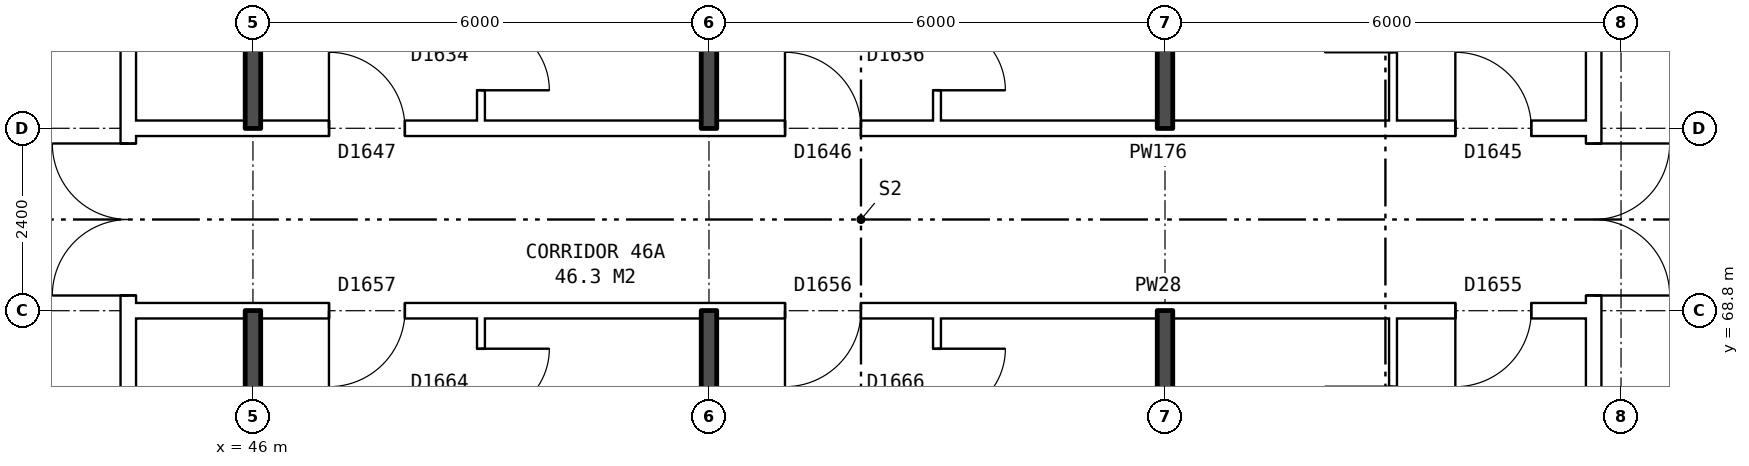
"""IFC4 building model, lengths in metres.
Left out: names, types, materials, properties, quantities, classifications, styles, units other than length and angle.
Written with IfcOpenShell. Run it as: python <this file> out.ifc"""

import sys

from ifc_helpers import new_model, si_unit, direction, frame, frame_2d, origin, place, context, subcontext, project, spatial, rectangle, extrude, element, fill, save


model = new_model("IFC4")
c1 = context("Model", 3, precision=1e-05, world=origin(), true_north=direction((0.0, 1.0)))
c2 = subcontext(c1, "Body", "Model", "MODEL_VIEW")
j1 = project(units=[si_unit("LENGTHUNIT", "METRE"), si_unit("PLANEANGLEUNIT", "RADIAN")], contexts=[c1])
p1 = place(None, origin())
s1 = spatial("IfcSite", under=j1, at=p1, CompositionType="ELEMENT")
p2 = place(p1, origin())
s2 = spatial("IfcBuilding", under=s1, at=p2, CompositionType="ELEMENT")
p3 = place(p2, frame((0.0, 0.0, 164.0)))
s3 = spatial("IfcBuildingStorey", under=s2, at=p3, CompositionType="ELEMENT", Elevation=164.0)
p4 = place(p3, frame((63.64, 63.9, 0.0), z_axis=(0.0, 0.0, 1.0), x_axis=(0.0, 1.0, 0.0)))
e1 = element("IfcWall", 1, at=p4, inside=s3, PredefinedType="PARTITIONING", context=c2, shape_type="SweptSolid", body=[
    extrude(rectangle(XDim=12.2, YDim=0.2, at=frame_2d((6.1, 0.0))), origin(), (0.0, 0.0, 1.0), 2.85),
])
p5 = place(p4, frame((5.1, 0.0, 0.0)))
e2 = element("IfcOpeningElement", 2, at=p5, cuts=e1, PredefinedType="OPENING", context=c2, shape_type="SweptSolid", body=[
    extrude(rectangle(XDim=2.0, YDim=2.1, at=frame_2d((1.0, 1.05))), frame((0.0, 0.11, 0.0), z_axis=(0.0, -1.0, 0.0), x_axis=(1.0, 0.0, 0.0)), (0.0, 0.0, 1.0), 0.22),
])
p6 = place(p3, frame((44.36, 63.9, 0.0), z_axis=(0.0, 0.0, 1.0), x_axis=(0.0, 1.0, 0.0)))
e3 = element("IfcWall", 3, at=p6, inside=s3, PredefinedType="PARTITIONING", context=c2, shape_type="SweptSolid", body=[
    extrude(rectangle(XDim=12.2, YDim=0.2, at=frame_2d((6.1, 0.0))), origin(), (0.0, 0.0, 1.0), 2.85),
])
p7 = place(p6, frame((5.1, 0.0, 0.0)))
e4 = element("IfcOpeningElement", 4, at=p7, cuts=e3, PredefinedType="OPENING", context=c2, shape_type="SweptSolid", body=[
    extrude(rectangle(XDim=2.0, YDim=2.1, at=frame_2d((1.0, 1.05))), frame((0.0, 0.11, 0.0), z_axis=(0.0, -1.0, 0.0), x_axis=(1.0, 0.0, 0.0)), (0.0, 0.0, 1.0), 0.22),
])
p8 = place(p3, frame((44.36, 68.8, 0.0), z_axis=(0.0, 0.0, 1.0), x_axis=(1.0, 0.0, 0.0)))
e5 = element("IfcWall", 5, at=p8, inside=s3, PredefinedType="PARTITIONING", context=c2, shape_type="SweptSolid", body=[
    extrude(rectangle(XDim=19.28, YDim=0.2, at=frame_2d((9.64, 0.0))), origin(), (0.0, 0.0, 1.0), 2.85),
])
p9 = place(p8, frame((17.46, 0.0, 0.0)))
e6 = element("IfcOpeningElement", 6, at=p9, cuts=e5, PredefinedType="OPENING", context=c2, shape_type="SweptSolid", body=[
    extrude(rectangle(XDim=1.0, YDim=2.1, at=frame_2d((0.5, 1.05))), frame((0.0, 0.11, 0.0), z_axis=(0.0, -1.0, 0.0), x_axis=(1.0, 0.0, 0.0)), (0.0, 0.0, 1.0), 0.22),
])
p10 = place(p8, frame((8.64, 0.0, 0.0)))
e7 = element("IfcOpeningElement", 7, at=p10, cuts=e5, PredefinedType="OPENING", context=c2, shape_type="SweptSolid", body=[
    extrude(rectangle(XDim=1.0, YDim=2.1, at=frame_2d((0.5, 1.05))), frame((0.0, 0.11, 0.0), z_axis=(0.0, -1.0, 0.0), x_axis=(1.0, 0.0, 0.0)), (0.0, 0.0, 1.0), 0.22),
])
p11 = place(p8, frame((2.64, 0.0, 0.0)))
e8 = element("IfcOpeningElement", 8, at=p11, cuts=e5, PredefinedType="OPENING", context=c2, shape_type="SweptSolid", body=[
    extrude(rectangle(XDim=1.0, YDim=2.1, at=frame_2d((0.5, 1.05))), frame((0.0, 0.11, 0.0), z_axis=(0.0, -1.0, 0.0), x_axis=(1.0, 0.0, 0.0)), (0.0, 0.0, 1.0), 0.22),
])
p12 = place(p3, frame((44.36, 71.2, 0.0), z_axis=(0.0, 0.0, 1.0), x_axis=(1.0, 0.0, 0.0)))
e9 = element("IfcWall", 9, at=p12, inside=s3, PredefinedType="PARTITIONING", context=c2, shape_type="SweptSolid", body=[
    extrude(rectangle(XDim=19.28, YDim=0.2, at=frame_2d((9.64, 0.0))), origin(), (0.0, 0.0, 1.0), 2.85),
])
p13 = place(p12, frame((17.46, 0.0, 0.0)))
e10 = element("IfcOpeningElement", 10, at=p13, cuts=e9, PredefinedType="OPENING", context=c2, shape_type="SweptSolid", body=[
    extrude(rectangle(XDim=1.0, YDim=2.1, at=frame_2d((0.5, 1.05))), frame((0.0, 0.11, 0.0), z_axis=(0.0, -1.0, 0.0), x_axis=(1.0, 0.0, 0.0)), (0.0, 0.0, 1.0), 0.22),
])
p14 = place(p12, frame((8.64, 0.0, 0.0)))
e11 = element("IfcOpeningElement", 11, at=p14, cuts=e9, PredefinedType="OPENING", context=c2, shape_type="SweptSolid", body=[
    extrude(rectangle(XDim=1.0, YDim=2.1, at=frame_2d((0.5, 1.05))), frame((0.0, 0.11, 0.0), z_axis=(0.0, -1.0, 0.0), x_axis=(1.0, 0.0, 0.0)), (0.0, 0.0, 1.0), 0.22),
])
p15 = place(p12, frame((2.64, 0.0, 0.0)))
e12 = element("IfcOpeningElement", 12, at=p15, cuts=e9, PredefinedType="OPENING", context=c2, shape_type="SweptSolid", body=[
    extrude(rectangle(XDim=1.0, YDim=2.1, at=frame_2d((0.5, 1.05))), frame((0.0, 0.11, 0.0), z_axis=(0.0, -1.0, 0.0), x_axis=(1.0, 0.0, 0.0)), (0.0, 0.0, 1.0), 0.22),
])
for number, where, z_axis, x_axis in (
    (13, (46.0, 63.8, 0.0), (0.0, 0.0, 1.0), (0.0, 1.0, 0.0)),
    (14, (46.0, 71.2, 0.0), (0.0, 0.0, 1.0), (0.0, 1.0, 0.0)),
):
    element("IfcWall", number, at=place(p3, frame(where, z_axis=z_axis, x_axis=x_axis)), inside=s3, PredefinedType="SOLIDWALL", context=c2, shape_type="SweptSolid", body=[
        extrude(rectangle(XDim=5.0, YDim=0.2, at=frame_2d((2.5, 0.0))), origin(), (0.0, 0.0, 1.0), 2.85),
    ])
p16 = place(p3, frame((49.0, 54.36, 0.0), z_axis=(0.0, 0.0, 1.0), x_axis=(0.0, 1.0, 0.0)))
e15 = element("IfcWall", 15, at=p16, inside=s3, PredefinedType="PARTITIONING", context=c2, shape_type="SweptSolid", body=[
    extrude(rectangle(XDim=14.34, YDim=0.1, at=frame_2d((7.17, 0.0))), origin(), (0.0, 0.0, 1.0), 2.85),
])
p17 = place(p16, frame((5.5, 0.0, 0.0)))
e16 = element("IfcOpeningElement", 16, at=p17, cuts=e15, PredefinedType="OPENING", context=c2, shape_type="SweptSolid", body=[
    extrude(rectangle(XDim=0.9, YDim=2.1, at=frame_2d((0.45, 1.05))), frame((0.0, 0.06, 0.0), z_axis=(0.0, -1.0, 0.0), x_axis=(1.0, 0.0, 0.0)), (0.0, 0.0, 1.0), 0.12),
])
p18 = place(p16, frame((13.04, 0.0, 0.0)))
e17 = element("IfcOpeningElement", 17, at=p18, cuts=e15, PredefinedType="OPENING", context=c2, shape_type="SweptSolid", body=[
    extrude(rectangle(XDim=0.9, YDim=2.1, at=frame_2d((0.45, 1.05))), frame((0.0, 0.06, 0.0), z_axis=(0.0, -1.0, 0.0), x_axis=(1.0, 0.0, 0.0)), (0.0, 0.0, 1.0), 0.12),
])
p19 = place(p3, frame((49.0, 71.3, 0.0), z_axis=(0.0, 0.0, 1.0), x_axis=(0.0, 1.0, 0.0)))
e18 = element("IfcWall", 18, at=p19, inside=s3, PredefinedType="PARTITIONING", context=c2, shape_type="SweptSolid", body=[
    extrude(rectangle(XDim=14.34, YDim=0.1, at=frame_2d((7.17, 0.0))), origin(), (0.0, 0.0, 1.0), 2.85),
])
p20 = place(p19, frame((7.94, 0.0, 0.0)))
e19 = element("IfcOpeningElement", 19, at=p20, cuts=e18, PredefinedType="OPENING", context=c2, shape_type="SweptSolid", body=[
    extrude(rectangle(XDim=0.9, YDim=2.1, at=frame_2d((0.45, 1.05))), frame((0.0, 0.06, 0.0), z_axis=(0.0, -1.0, 0.0), x_axis=(1.0, 0.0, 0.0)), (0.0, 0.0, 1.0), 0.12),
])
p21 = place(p19, frame((0.4, 0.0, 0.0)))
e20 = element("IfcOpeningElement", 20, at=p21, cuts=e18, PredefinedType="OPENING", context=c2, shape_type="SweptSolid", body=[
    extrude(rectangle(XDim=0.9, YDim=2.1, at=frame_2d((0.45, 1.05))), frame((0.0, 0.06, 0.0), z_axis=(0.0, -1.0, 0.0), x_axis=(1.0, 0.0, 0.0)), (0.0, 0.0, 1.0), 0.12),
])
for number, where, z_axis, x_axis in (
    (21, (52.0, 54.36, 0.0), (0.0, 0.0, 1.0), (0.0, 1.0, 0.0)),
    (22, (52.0, 71.2, 0.0), (0.0, 0.0, 1.0), (0.0, 1.0, 0.0)),
):
    element("IfcWall", number, at=place(p3, frame(where, z_axis=z_axis, x_axis=x_axis)), inside=s3, PredefinedType="SOLIDWALL", context=c2, shape_type="SweptSolid", body=[
        extrude(rectangle(XDim=14.44, YDim=0.2, at=frame_2d((7.22, 0.0))), origin(), (0.0, 0.0, 1.0), 2.85),
    ])
p22 = place(p3, frame((55.0, 54.36, 0.0), z_axis=(0.0, 0.0, 1.0), x_axis=(0.0, 1.0, 0.0)))
e23 = element("IfcWall", 23, at=p22, inside=s3, PredefinedType="PARTITIONING", context=c2, shape_type="SweptSolid", body=[
    extrude(rectangle(XDim=14.34, YDim=0.1, at=frame_2d((7.17, 0.0))), origin(), (0.0, 0.0, 1.0), 2.85),
])
p23 = place(p22, frame((5.5, 0.0, 0.0)))
e24 = element("IfcOpeningElement", 24, at=p23, cuts=e23, PredefinedType="OPENING", context=c2, shape_type="SweptSolid", body=[
    extrude(rectangle(XDim=0.9, YDim=2.1, at=frame_2d((0.45, 1.05))), frame((0.0, 0.06, 0.0), z_axis=(0.0, -1.0, 0.0), x_axis=(1.0, 0.0, 0.0)), (0.0, 0.0, 1.0), 0.12),
])
p24 = place(p22, frame((13.04, 0.0, 0.0)))
e25 = element("IfcOpeningElement", 25, at=p24, cuts=e23, PredefinedType="OPENING", context=c2, shape_type="SweptSolid", body=[
    extrude(rectangle(XDim=0.9, YDim=2.1, at=frame_2d((0.45, 1.05))), frame((0.0, 0.06, 0.0), z_axis=(0.0, -1.0, 0.0), x_axis=(1.0, 0.0, 0.0)), (0.0, 0.0, 1.0), 0.12),
])
p25 = place(p3, frame((55.0, 71.3, 0.0), z_axis=(0.0, 0.0, 1.0), x_axis=(0.0, 1.0, 0.0)))
e26 = element("IfcWall", 26, at=p25, inside=s3, PredefinedType="PARTITIONING", context=c2, shape_type="SweptSolid", body=[
    extrude(rectangle(XDim=14.34, YDim=0.1, at=frame_2d((7.17, 0.0))), origin(), (0.0, 0.0, 1.0), 2.85),
])
p26 = place(p25, frame((6.74, 0.0, 0.0)))
e27 = element("IfcOpeningElement", 27, at=p26, cuts=e26, PredefinedType="OPENING", context=c2, shape_type="SweptSolid", body=[
    extrude(rectangle(XDim=0.9, YDim=2.1, at=frame_2d((0.45, 1.05))), frame((0.0, 0.06, 0.0), z_axis=(0.0, -1.0, 0.0), x_axis=(1.0, 0.0, 0.0)), (0.0, 0.0, 1.0), 0.12),
])
p27 = place(p25, frame((0.4, 0.0, 0.0)))
e28 = element("IfcOpeningElement", 28, at=p27, cuts=e26, PredefinedType="OPENING", context=c2, shape_type="SweptSolid", body=[
    extrude(rectangle(XDim=0.9, YDim=2.1, at=frame_2d((0.45, 1.05))), frame((0.0, 0.06, 0.0), z_axis=(0.0, -1.0, 0.0), x_axis=(1.0, 0.0, 0.0)), (0.0, 0.0, 1.0), 0.12),
])
for number, where, z_axis, x_axis in (
    (29, (58.0, 54.36, 0.0), (0.0, 0.0, 1.0), (0.0, 1.0, 0.0)),
    (30, (58.0, 71.2, 0.0), (0.0, 0.0, 1.0), (0.0, 1.0, 0.0)),
):
    element("IfcWall", number, at=place(p3, frame(where, z_axis=z_axis, x_axis=x_axis)), inside=s3, PredefinedType="SOLIDWALL", context=c2, shape_type="SweptSolid", body=[
        extrude(rectangle(XDim=14.44, YDim=0.2, at=frame_2d((7.22, 0.0))), origin(), (0.0, 0.0, 1.0), 2.85),
    ])
p28 = place(p3, frame((61.0, 54.36, 0.0), z_axis=(0.0, 0.0, 1.0), x_axis=(0.0, 1.0, 0.0)))
e31 = element("IfcWall", 31, at=p28, inside=s3, PredefinedType="PARTITIONING", context=c2, shape_type="SweptSolid", body=[
    extrude(rectangle(XDim=14.34, YDim=0.1, at=frame_2d((7.17, 0.0))), origin(), (0.0, 0.0, 1.0), 2.85),
])
p29 = place(p28, frame((6.7, 0.0, 0.0)))
e32 = element("IfcOpeningElement", 32, at=p29, cuts=e31, PredefinedType="OPENING", context=c2, shape_type="SweptSolid", body=[
    extrude(rectangle(XDim=0.9, YDim=2.1, at=frame_2d((0.45, 1.05))), frame((0.0, 0.06, 0.0), z_axis=(0.0, -1.0, 0.0), x_axis=(1.0, 0.0, 0.0)), (0.0, 0.0, 1.0), 0.12),
])
p30 = place(p28, frame((12.54, 0.0, 0.0)))
e33 = element("IfcOpeningElement", 33, at=p30, cuts=e31, PredefinedType="OPENING", context=c2, shape_type="SweptSolid", body=[
    extrude(rectangle(XDim=0.9, YDim=2.1, at=frame_2d((0.45, 1.05))), frame((0.0, 0.06, 0.0), z_axis=(0.0, -1.0, 0.0), x_axis=(1.0, 0.0, 0.0)), (0.0, 0.0, 1.0), 0.12),
])
p31 = place(p3, frame((61.0, 71.3, 0.0), z_axis=(0.0, 0.0, 1.0), x_axis=(0.0, 1.0, 0.0)))
e34 = element("IfcWall", 34, at=p31, inside=s3, PredefinedType="PARTITIONING", context=c2, shape_type="SweptSolid", body=[
    extrude(rectangle(XDim=14.34, YDim=0.1, at=frame_2d((7.17, 0.0))), origin(), (0.0, 0.0, 1.0), 2.85),
])
p32 = place(p31, frame((7.94, 0.0, 0.0)))
e35 = element("IfcOpeningElement", 35, at=p32, cuts=e34, PredefinedType="OPENING", context=c2, shape_type="SweptSolid", body=[
    extrude(rectangle(XDim=0.9, YDim=2.1, at=frame_2d((0.45, 1.05))), frame((0.0, 0.06, 0.0), z_axis=(0.0, -1.0, 0.0), x_axis=(1.0, 0.0, 0.0)), (0.0, 0.0, 1.0), 0.12),
])
p33 = place(p31, frame((0.9, 0.0, 0.0)))
e36 = element("IfcOpeningElement", 36, at=p33, cuts=e34, PredefinedType="OPENING", context=c2, shape_type="SweptSolid", body=[
    extrude(rectangle(XDim=0.9, YDim=2.1, at=frame_2d((0.45, 1.05))), frame((0.0, 0.06, 0.0), z_axis=(0.0, -1.0, 0.0), x_axis=(1.0, 0.0, 0.0)), (0.0, 0.0, 1.0), 0.12),
])
p34 = place(p5, frame((2.0, 0.0, 0.0), z_axis=(0.0, 0.0, 1.0), x_axis=(-1.0, 0.0, 0.0)))
e37 = element("IfcDoor", 37, at=p34, inside=s3, OperationType="DOUBLE_DOOR_SINGLE_SWING", PredefinedType="DOOR", context=c2, shape_type="SweptSolid", body=[
    extrude(rectangle(XDim=2.0, YDim=2.1, at=frame_2d((1.0, 1.05))), frame((0.0, 0.025, 0.0), z_axis=(0.0, -1.0, 0.0), x_axis=(1.0, 0.0, 0.0)), (0.0, 0.0, 1.0), 0.05),
])
fill(e2, e37)
p35 = place(p7, origin())
e38 = element("IfcDoor", 38, at=p35, inside=s3, OperationType="DOUBLE_DOOR_SINGLE_SWING", PredefinedType="DOOR", context=c2, shape_type="SweptSolid", body=[
    extrude(rectangle(XDim=2.0, YDim=2.1, at=frame_2d((1.0, 1.05))), frame((0.0, 0.025, 0.0), z_axis=(0.0, -1.0, 0.0), x_axis=(1.0, 0.0, 0.0)), (0.0, 0.0, 1.0), 0.05),
])
fill(e4, e38)
p36 = place(p9, frame((1.0, 0.0, 0.0), z_axis=(0.0, 0.0, 1.0), x_axis=(-1.0, 0.0, 0.0)))
e39 = element("IfcDoor", 39, at=p36, inside=s3, OperationType="SINGLE_SWING_RIGHT", PredefinedType="DOOR", context=c2, shape_type="SweptSolid", body=[
    extrude(rectangle(XDim=1.0, YDim=2.1, at=frame_2d((0.5, 1.05))), frame((0.0, 0.025, 0.0), z_axis=(0.0, -1.0, 0.0), x_axis=(1.0, 0.0, 0.0)), (0.0, 0.0, 1.0), 0.05),
])
fill(e6, e39)
p37 = place(p10, frame((1.0, 0.0, 0.0), z_axis=(0.0, 0.0, 1.0), x_axis=(-1.0, 0.0, 0.0)))
e40 = element("IfcDoor", 40, at=p37, inside=s3, OperationType="SINGLE_SWING_RIGHT", PredefinedType="DOOR", context=c2, shape_type="SweptSolid", body=[
    extrude(rectangle(XDim=1.0, YDim=2.1, at=frame_2d((0.5, 1.05))), frame((0.0, 0.025, 0.0), z_axis=(0.0, -1.0, 0.0), x_axis=(1.0, 0.0, 0.0)), (0.0, 0.0, 1.0), 0.05),
])
fill(e7, e40)
p38 = place(p24, frame((0.9, 0.0, 0.0), z_axis=(0.0, 0.0, 1.0), x_axis=(-1.0, 0.0, 0.0)))
e41 = element("IfcDoor", 41, at=p38, inside=s3, OperationType="SINGLE_SWING_LEFT", PredefinedType="DOOR", context=c2, shape_type="SweptSolid", body=[
    extrude(rectangle(XDim=0.9, YDim=2.1, at=frame_2d((0.45, 1.05))), frame((0.0, 0.025, 0.0), z_axis=(0.0, -1.0, 0.0), x_axis=(1.0, 0.0, 0.0)), (0.0, 0.0, 1.0), 0.05),
])
fill(e25, e41)
p39 = place(p11, frame((1.0, 0.0, 0.0), z_axis=(0.0, 0.0, 1.0), x_axis=(-1.0, 0.0, 0.0)))
e42 = element("IfcDoor", 42, at=p39, inside=s3, OperationType="SINGLE_SWING_RIGHT", PredefinedType="DOOR", context=c2, shape_type="SweptSolid", body=[
    extrude(rectangle(XDim=1.0, YDim=2.1, at=frame_2d((0.5, 1.05))), frame((0.0, 0.025, 0.0), z_axis=(0.0, -1.0, 0.0), x_axis=(1.0, 0.0, 0.0)), (0.0, 0.0, 1.0), 0.05),
])
fill(e8, e42)
p40 = place(p18, frame((0.9, 0.0, 0.0), z_axis=(0.0, 0.0, 1.0), x_axis=(-1.0, 0.0, 0.0)))
e43 = element("IfcDoor", 43, at=p40, inside=s3, OperationType="SINGLE_SWING_LEFT", PredefinedType="DOOR", context=c2, shape_type="SweptSolid", body=[
    extrude(rectangle(XDim=0.9, YDim=2.1, at=frame_2d((0.45, 1.05))), frame((0.0, 0.025, 0.0), z_axis=(0.0, -1.0, 0.0), x_axis=(1.0, 0.0, 0.0)), (0.0, 0.0, 1.0), 0.05),
])
fill(e17, e43)
p41 = place(p13, origin())
e44 = element("IfcDoor", 44, at=p41, inside=s3, OperationType="SINGLE_SWING_LEFT", PredefinedType="DOOR", context=c2, shape_type="SweptSolid", body=[
    extrude(rectangle(XDim=1.0, YDim=2.1, at=frame_2d((0.5, 1.05))), frame((0.0, 0.025, 0.0), z_axis=(0.0, -1.0, 0.0), x_axis=(1.0, 0.0, 0.0)), (0.0, 0.0, 1.0), 0.05),
])
fill(e10, e44)
p42 = place(p14, origin())
e45 = element("IfcDoor", 45, at=p42, inside=s3, OperationType="SINGLE_SWING_LEFT", PredefinedType="DOOR", context=c2, shape_type="SweptSolid", body=[
    extrude(rectangle(XDim=1.0, YDim=2.1, at=frame_2d((0.5, 1.05))), frame((0.0, 0.025, 0.0), z_axis=(0.0, -1.0, 0.0), x_axis=(1.0, 0.0, 0.0)), (0.0, 0.0, 1.0), 0.05),
])
fill(e11, e45)
p43 = place(p27, frame((0.9, 0.0, 0.0), z_axis=(0.0, 0.0, 1.0), x_axis=(-1.0, 0.0, 0.0)))
e46 = element("IfcDoor", 46, at=p43, inside=s3, OperationType="SINGLE_SWING_RIGHT", PredefinedType="DOOR", context=c2, shape_type="SweptSolid", body=[
    extrude(rectangle(XDim=0.9, YDim=2.1, at=frame_2d((0.45, 1.05))), frame((0.0, 0.025, 0.0), z_axis=(0.0, -1.0, 0.0), x_axis=(1.0, 0.0, 0.0)), (0.0, 0.0, 1.0), 0.05),
])
fill(e28, e46)
p44 = place(p15, origin())
e47 = element("IfcDoor", 47, at=p44, inside=s3, OperationType="SINGLE_SWING_LEFT", PredefinedType="DOOR", context=c2, shape_type="SweptSolid", body=[
    extrude(rectangle(XDim=1.0, YDim=2.1, at=frame_2d((0.5, 1.05))), frame((0.0, 0.025, 0.0), z_axis=(0.0, -1.0, 0.0), x_axis=(1.0, 0.0, 0.0)), (0.0, 0.0, 1.0), 0.05),
])
fill(e12, e47)
p45 = place(p21, frame((0.9, 0.0, 0.0), z_axis=(0.0, 0.0, 1.0), x_axis=(-1.0, 0.0, 0.0)))
e48 = element("IfcDoor", 48, at=p45, inside=s3, OperationType="SINGLE_SWING_RIGHT", PredefinedType="DOOR", context=c2, shape_type="SweptSolid", body=[
    extrude(rectangle(XDim=0.9, YDim=2.1, at=frame_2d((0.45, 1.05))), frame((0.0, 0.025, 0.0), z_axis=(0.0, -1.0, 0.0), x_axis=(1.0, 0.0, 0.0)), (0.0, 0.0, 1.0), 0.05),
])
fill(e20, e48)
save(model, sys.argv[1])
